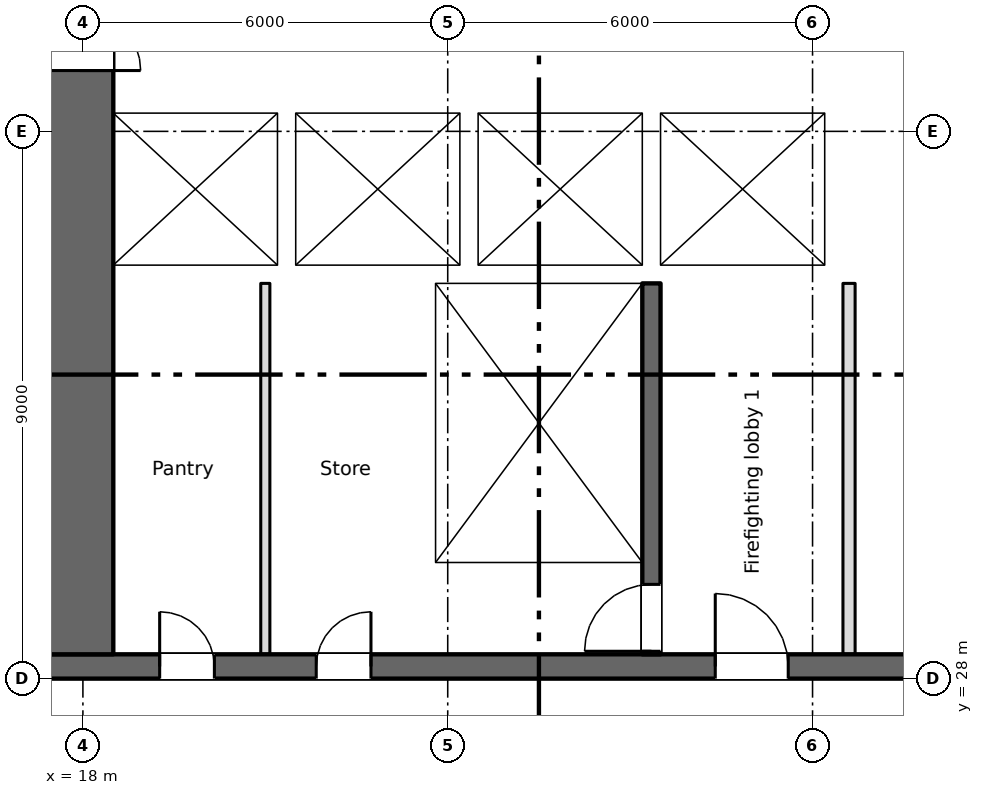
"""IFC4 building model, lengths in metres.
Left out: names, types, materials, properties, quantities, classifications, styles, units other than length and angle.
Written with IfcOpenShell. Run it as: python <this file> out.ifc"""

import sys

from ifc_helpers import new_model, si_unit, direction, frame, frame_2d, origin, place, context, subcontext, project, spatial, rectangle, extrude, element, fill, save


model = new_model("IFC4")
c1 = context("Model", 3, precision=1e-05, world=origin(), true_north=direction((0.0, 1.0)))
c2 = subcontext(c1, "Body", "Model", "MODEL_VIEW")
j1 = project(units=[si_unit("LENGTHUNIT", "METRE"), si_unit("PLANEANGLEUNIT", "RADIAN")], contexts=[c1])
p1 = place(None, origin())
s1 = spatial("IfcSite", under=j1, at=p1, CompositionType="ELEMENT")
p2 = place(p1, origin())
s2 = spatial("IfcBuilding", under=s1, at=p2, CompositionType="ELEMENT")
p3 = place(p2, frame((0.0, 0.0, 17.9)))
s3 = spatial("IfcBuildingStorey", under=s2, at=p3, CompositionType="ELEMENT", Elevation=17.9)
p4 = place(p3, frame((6.7, 28.2, 0.0), z_axis=(0.0, 0.0, 1.0), x_axis=(1.0, 0.0, 0.0)))
e1 = element("IfcWall", 1, at=p4, inside=s3, PredefinedType="SHEAR", context=c2, shape_type="SweptSolid", body=[
    extrude(rectangle(XDim=66.3, YDim=0.4, at=frame_2d((33.15, 0.0))), origin(), (0.0, 0.0, 1.0), 3.8),
])
p5 = place(p4, frame((12.562, 0.0, 0.0)))
e2 = element("IfcOpeningElement", 2, at=p5, cuts=e1, PredefinedType="OPENING", context=c2, shape_type="SweptSolid", body=[
    extrude(rectangle(XDim=0.9, YDim=2.1, at=frame_2d((0.45, 1.05))), frame((0.0, 0.21, 0.0), z_axis=(0.0, -1.0, 0.0), x_axis=(1.0, 0.0, 0.0)), (0.0, 0.0, 1.0), 0.42),
])
p6 = place(p4, frame((15.137, 0.0, 0.0)))
e3 = element("IfcOpeningElement", 3, at=p6, cuts=e1, PredefinedType="OPENING", context=c2, shape_type="SweptSolid", body=[
    extrude(rectangle(XDim=0.9, YDim=2.1, at=frame_2d((0.45, 1.05))), frame((0.0, 0.21, 0.0), z_axis=(0.0, -1.0, 0.0), x_axis=(1.0, 0.0, 0.0)), (0.0, 0.0, 1.0), 0.42),
])
p7 = place(p4, frame((49.85, 0.0, 0.0)))
e4 = element("IfcOpeningElement", 4, at=p7, cuts=e1, PredefinedType="OPENING", context=c2, shape_type="SweptSolid", body=[
    extrude(rectangle(XDim=0.9, YDim=2.1, at=frame_2d((0.45, 1.05))), frame((0.0, 0.21, 0.0), z_axis=(0.0, -1.0, 0.0), x_axis=(1.0, 0.0, 0.0)), (0.0, 0.0, 1.0), 0.42),
])
p8 = place(p4, frame((0.562, 0.0, 0.0)))
e5 = element("IfcOpeningElement", 5, at=p8, cuts=e1, PredefinedType="OPENING", context=c2, shape_type="SweptSolid", body=[
    extrude(rectangle(XDim=0.9, YDim=2.1, at=frame_2d((0.45, 1.05))), frame((0.0, 0.21, 0.0), z_axis=(0.0, -1.0, 0.0), x_axis=(1.0, 0.0, 0.0)), (0.0, 0.0, 1.0), 0.42),
])
p9 = place(p4, frame((2.137, 0.0, 0.0)))
e6 = element("IfcOpeningElement", 6, at=p9, cuts=e1, PredefinedType="OPENING", context=c2, shape_type="SweptSolid", body=[
    extrude(rectangle(XDim=0.9, YDim=2.1, at=frame_2d((0.45, 1.05))), frame((0.0, 0.21, 0.0), z_axis=(0.0, -1.0, 0.0), x_axis=(1.0, 0.0, 0.0)), (0.0, 0.0, 1.0), 0.42),
])
p10 = place(p4, frame((61.45, 0.0, 0.0)))
e7 = element("IfcOpeningElement", 7, at=p10, cuts=e1, PredefinedType="OPENING", context=c2, shape_type="SweptSolid", body=[
    extrude(rectangle(XDim=0.9, YDim=2.1, at=frame_2d((0.45, 1.05))), frame((0.0, 0.21, 0.0), z_axis=(0.0, -1.0, 0.0), x_axis=(1.0, 0.0, 0.0)), (0.0, 0.0, 1.0), 0.42),
])
p11 = place(p4, frame((4.7, 0.0, 0.0)))
e8 = element("IfcOpeningElement", 8, at=p11, cuts=e1, PredefinedType="OPENING", context=c2, shape_type="SweptSolid", body=[
    extrude(rectangle(XDim=1.2, YDim=2.1, at=frame_2d((0.6, 1.05))), frame((0.0, 0.21, 0.0), z_axis=(0.0, -1.0, 0.0), x_axis=(1.0, 0.0, 0.0)), (0.0, 0.0, 1.0), 0.42),
])
p12 = place(p4, frame((31.7, 0.0, 0.0)))
e9 = element("IfcOpeningElement", 9, at=p12, cuts=e1, PredefinedType="OPENING", context=c2, shape_type="SweptSolid", body=[
    extrude(rectangle(XDim=1.2, YDim=2.1, at=frame_2d((0.6, 1.05))), frame((0.0, 0.21, 0.0), z_axis=(0.0, -1.0, 0.0), x_axis=(1.0, 0.0, 0.0)), (0.0, 0.0, 1.0), 0.42),
])
p13 = place(p4, frame((55.2, 0.0, 0.0)))
e10 = element("IfcOpeningElement", 10, at=p13, cuts=e1, PredefinedType="OPENING", context=c2, shape_type="SweptSolid", body=[
    extrude(rectangle(XDim=1.2, YDim=2.1, at=frame_2d((0.6, 1.05))), frame((0.0, 0.21, 0.0), z_axis=(0.0, -1.0, 0.0), x_axis=(1.0, 0.0, 0.0)), (0.0, 0.0, 1.0), 0.42),
])
p14 = place(p4, frame((21.7, 0.0, 0.0)))
e11 = element("IfcOpeningElement", 11, at=p14, cuts=e1, PredefinedType="OPENING", context=c2, shape_type="SweptSolid", body=[
    extrude(rectangle(XDim=1.2, YDim=2.1, at=frame_2d((0.6, 1.05))), frame((0.0, 0.21, 0.0), z_axis=(0.0, -1.0, 0.0), x_axis=(1.0, 0.0, 0.0)), (0.0, 0.0, 1.0), 0.42),
])
p15 = place(p4, frame((41.7, 0.0, 0.0)))
e12 = element("IfcOpeningElement", 12, at=p15, cuts=e1, PredefinedType="OPENING", context=c2, shape_type="SweptSolid", body=[
    extrude(rectangle(XDim=1.2, YDim=2.1, at=frame_2d((0.6, 1.05))), frame((0.0, 0.21, 0.0), z_axis=(0.0, -1.0, 0.0), x_axis=(1.0, 0.0, 0.0)), (0.0, 0.0, 1.0), 0.42),
])
p16 = place(p4, frame((24.85, 0.0, 0.0)))
e13 = element("IfcOpeningElement", 13, at=p16, cuts=e1, PredefinedType="OPENING", context=c2, shape_type="SweptSolid", body=[
    extrude(rectangle(XDim=2.4, YDim=2.1, at=frame_2d((1.2, 1.05))), frame((0.0, 0.21, 0.0), z_axis=(0.0, -1.0, 0.0), x_axis=(1.0, 0.0, 0.0)), (0.0, 0.0, 1.0), 0.42),
])
p17 = place(p4, frame((37.35, 0.0, 0.0)))
e14 = element("IfcOpeningElement", 14, at=p17, cuts=e1, PredefinedType="OPENING", context=c2, shape_type="SweptSolid", body=[
    extrude(rectangle(XDim=2.4, YDim=2.1, at=frame_2d((1.2, 1.05))), frame((0.0, 0.21, 0.0), z_axis=(0.0, -1.0, 0.0), x_axis=(1.0, 0.0, 0.0)), (0.0, 0.0, 1.0), 0.42),
])
p18 = place(p4, frame((7.8, 0.0, 0.0)))
e15 = element("IfcOpeningElement", 15, at=p18, cuts=e1, PredefinedType="OPENING", context=c2, shape_type="SweptSolid", body=[
    extrude(rectangle(XDim=2.4, YDim=2.1, at=frame_2d((1.2, 1.05))), frame((0.0, 0.21, 0.0), z_axis=(0.0, -1.0, 0.0), x_axis=(1.0, 0.0, 0.0)), (0.0, 0.0, 1.0), 0.42),
])
p19 = place(p4, frame((28.85, 0.0, 0.0)))
e16 = element("IfcOpeningElement", 16, at=p19, cuts=e1, PredefinedType="OPENING", context=c2, shape_type="SweptSolid", body=[
    extrude(rectangle(XDim=0.9, YDim=2.1, at=frame_2d((0.45, 1.05))), frame((0.0, 0.21, 0.0), z_axis=(0.0, -1.0, 0.0), x_axis=(1.0, 0.0, 0.0)), (0.0, 0.0, 1.0), 0.42),
])
p20 = place(p4, frame((34.85, 0.0, 0.0)))
e17 = element("IfcOpeningElement", 17, at=p20, cuts=e1, PredefinedType="OPENING", context=c2, shape_type="SweptSolid", body=[
    extrude(rectangle(XDim=0.9, YDim=2.1, at=frame_2d((0.45, 1.05))), frame((0.0, 0.21, 0.0), z_axis=(0.0, -1.0, 0.0), x_axis=(1.0, 0.0, 0.0)), (0.0, 0.0, 1.0), 0.42),
])
p21 = place(p3, frame((17.95, 28.4, 0.0), z_axis=(0.0, 0.0, 1.0), x_axis=(0.0, 1.0, 0.0)))
e18 = element("IfcWall", 18, at=p21, inside=s3, PredefinedType="SHEAR", context=c2, shape_type="SweptSolid", body=[
    extrude(rectangle(XDim=16.5, YDim=1.1, at=frame_2d((8.25, 0.0))), origin(), (0.0, 0.0, 1.0), 3.8),
])
p22 = place(p21, frame((9.6, 0.0, 0.0)))
e19 = element("IfcOpeningElement", 19, at=p22, cuts=e18, PredefinedType="OPENING", context=c2, shape_type="SweptSolid", body=[
    extrude(rectangle(XDim=2.0, YDim=2.1, at=frame_2d((1.0, 1.05))), frame((0.0, 0.56, 0.0), z_axis=(0.0, -1.0, 0.0), x_axis=(1.0, 0.0, 0.0)), (0.0, 0.0, 1.0), 1.12),
])
p23 = place(p21, frame((15.2, 0.0, 0.0)))
e20 = element("IfcOpeningElement", 20, at=p23, cuts=e18, PredefinedType="OPENING", context=c2, shape_type="SweptSolid", body=[
    extrude(rectangle(XDim=1.2, YDim=2.1, at=frame_2d((0.6, 1.05))), frame((0.0, 0.56, 0.0), z_axis=(0.0, -1.0, 0.0), x_axis=(1.0, 0.0, 0.0)), (0.0, 0.0, 1.0), 1.12),
])
p24 = place(p3, frame((23.65, 28.4, 0.0), z_axis=(0.0, 0.0, 1.0), x_axis=(0.0, 1.0, 0.0)))
e21 = element("IfcWall", 21, at=p24, inside=s3, PredefinedType="SHEAR", context=c2, shape_type="SweptSolid", body=[
    extrude(rectangle(XDim=6.1, YDim=0.3, at=frame_2d((3.05, 0.0))), origin(), (0.0, 0.0, 1.0), 3.8),
])
p25 = place(p3, frame((27.35, 28.4, 0.0), z_axis=(0.0, 0.0, 1.0), x_axis=(0.0, 1.0, 0.0)))
e22 = element("IfcWall", 22, at=p25, inside=s3, PredefinedType="SHEAR", context=c2, shape_type="SweptSolid", body=[
    extrude(rectangle(XDim=6.1, YDim=0.3, at=frame_2d((3.05, 0.0))), origin(), (0.0, 0.0, 1.0), 3.8),
])
p26 = place(p25, frame((0.05, 0.0, 0.0)))
e23 = element("IfcOpeningElement", 23, at=p26, cuts=e22, PredefinedType="OPENING", context=c2, shape_type="SweptSolid", body=[
    extrude(rectangle(XDim=1.1, YDim=2.1, at=frame_2d((0.55, 1.05))), frame((0.0, 0.16, 0.0), z_axis=(0.0, -1.0, 0.0), x_axis=(1.0, 0.0, 0.0)), (0.0, 0.0, 1.0), 0.32),
])
p27 = place(p3, frame((18.5, 34.65, 0.0), z_axis=(0.0, 0.0, 1.0), x_axis=(1.0, 0.0, 0.0)))
e24 = element("IfcWall", 24, at=p27, inside=s3, PredefinedType="SHEAR", context=c2, shape_type="SweptSolid", body=[
    extrude(rectangle(XDim=12.2, YDim=0.3, at=frame_2d((6.1, 0.0))), origin(), (0.0, 0.0, 1.0), 3.8),
])
p28 = place(p27, frame((9.8, 0.0, 0.0)))
e25 = element("IfcOpeningElement", 25, at=p28, cuts=e24, PredefinedType="OPENING", context=c2, shape_type="SweptSolid", body=[
    extrude(rectangle(XDim=1.1, YDim=2.1, at=frame_2d((0.55, 1.05))), frame((0.0, 0.16, 0.0), z_axis=(0.0, -1.0, 0.0), x_axis=(1.0, 0.0, 0.0)), (0.0, 0.0, 1.0), 0.32),
])
p29 = place(p3, frame((18.5, 37.45, 0.0), z_axis=(0.0, 0.0, 1.0), x_axis=(1.0, 0.0, 0.0)))
e26 = element("IfcWall", 26, at=p29, inside=s3, PredefinedType="SHEAR", context=c2, shape_type="SweptSolid", body=[
    extrude(rectangle(XDim=12.2, YDim=0.3, at=frame_2d((6.1, 0.0))), origin(), (0.0, 0.0, 1.0), 3.8),
])
p30 = place(p29, frame((0.8, 0.0, 0.0)))
e27 = element("IfcOpeningElement", 27, at=p30, cuts=e26, PredefinedType="OPENING", context=c2, shape_type="SweptSolid", body=[
    extrude(rectangle(XDim=1.1, YDim=2.1, at=frame_2d((0.55, 1.05))), frame((0.0, 0.16, 0.0), z_axis=(0.0, -1.0, 0.0), x_axis=(1.0, 0.0, 0.0)), (0.0, 0.0, 1.0), 0.32),
])
p31 = place(p29, frame((3.8, 0.0, 0.0)))
e28 = element("IfcOpeningElement", 28, at=p31, cuts=e26, PredefinedType="OPENING", context=c2, shape_type="SweptSolid", body=[
    extrude(rectangle(XDim=1.1, YDim=2.1, at=frame_2d((0.55, 1.05))), frame((0.0, 0.16, 0.0), z_axis=(0.0, -1.0, 0.0), x_axis=(1.0, 0.0, 0.0)), (0.0, 0.0, 1.0), 0.32),
])
p32 = place(p29, frame((6.8, 0.0, 0.0)))
e29 = element("IfcOpeningElement", 29, at=p32, cuts=e26, PredefinedType="OPENING", context=c2, shape_type="SweptSolid", body=[
    extrude(rectangle(XDim=1.1, YDim=2.1, at=frame_2d((0.55, 1.05))), frame((0.0, 0.16, 0.0), z_axis=(0.0, -1.0, 0.0), x_axis=(1.0, 0.0, 0.0)), (0.0, 0.0, 1.0), 0.32),
])
p33 = place(p3, frame((27.35, 34.8, 0.0), z_axis=(0.0, 0.0, 1.0), x_axis=(0.0, 1.0, 0.0)))
e30 = element("IfcWall", 30, at=p33, inside=s3, PredefinedType="SHEAR", context=c2, shape_type="SweptSolid", body=[
    extrude(rectangle(XDim=2.5, YDim=0.3, at=frame_2d((1.25, 0.0))), origin(), (0.0, 0.0, 1.0), 3.8),
])
p34 = place(p3, frame((30.45, 34.8, 0.0), z_axis=(0.0, 0.0, 1.0), x_axis=(0.0, 1.0, 0.0)))
e31 = element("IfcWall", 31, at=p34, inside=s3, PredefinedType="SHEAR", context=c2, shape_type="SweptSolid", body=[
    extrude(rectangle(XDim=2.5, YDim=0.5, at=frame_2d((1.25, 0.0))), origin(), (0.0, 0.0, 1.0), 3.8),
])
for number, where, z_axis, x_axis in (
    (32, (21.35, 34.8, 0.0), (0.0, 0.0, 1.0), (0.0, 1.0, 0.0)),
    (33, (24.35, 34.8, 0.0), (0.0, 0.0, 1.0), (0.0, 1.0, 0.0)),
):
    element("IfcWall", number, at=place(p3, frame(where, z_axis=z_axis, x_axis=x_axis)), inside=s3, PredefinedType="SHEAR", context=c2, shape_type="SweptSolid", body=[
        extrude(rectangle(XDim=2.5, YDim=0.3, at=frame_2d((1.25, 0.0))), origin(), (0.0, 0.0, 1.0), 3.8),
    ])
p35 = place(p3, frame((30.6, 28.4, 0.0), z_axis=(0.0, 0.0, 1.0), x_axis=(0.0, 1.0, 0.0)))
e34 = element("IfcWall", 34, at=p35, inside=s3, PredefinedType="PARTITIONING", context=c2, shape_type="SweptSolid", body=[
    extrude(rectangle(XDim=6.1, YDim=0.2, at=frame_2d((3.05, 0.0))), origin(), (0.0, 0.0, 1.0), 3.8),
])
p36 = place(p3, frame((21.0, 28.4, 0.0), z_axis=(0.0, 0.0, 1.0), x_axis=(0.0, 1.0, 0.0)))
e35 = element("IfcWall", 35, at=p36, inside=s3, PredefinedType="PARTITIONING", context=c2, shape_type="SweptSolid", body=[
    extrude(rectangle(XDim=6.1, YDim=0.15, at=frame_2d((3.05, 0.0))), origin(), (0.0, 0.0, 1.0), 3.8),
])
p37 = place(p5, origin())
e36 = element("IfcDoor", 36, at=p37, inside=s3, OperationType="SINGLE_SWING_LEFT", PredefinedType="DOOR", context=c2, shape_type="SweptSolid", body=[
    extrude(rectangle(XDim=0.9, YDim=2.1, at=frame_2d((0.45, 1.05))), frame((0.0, 0.025, 0.0), z_axis=(0.0, -1.0, 0.0), x_axis=(1.0, 0.0, 0.0)), (0.0, 0.0, 1.0), 0.05),
])
fill(e2, e36)
p38 = place(p6, origin())
e37 = element("IfcDoor", 37, at=p38, inside=s3, OperationType="SINGLE_SWING_RIGHT", PredefinedType="DOOR", context=c2, shape_type="SweptSolid", body=[
    extrude(rectangle(XDim=0.9, YDim=2.1, at=frame_2d((0.45, 1.05))), frame((0.0, 0.025, 0.0), z_axis=(0.0, -1.0, 0.0), x_axis=(1.0, 0.0, 0.0)), (0.0, 0.0, 1.0), 0.05),
])
fill(e3, e37)
p39 = place(p30, origin())
e38 = element("IfcDoor", 38, at=p39, inside=s3, OperationType="SLIDING_TO_LEFT", PredefinedType="DOOR", context=c2, shape_type="SweptSolid", body=[
    extrude(rectangle(XDim=1.1, YDim=2.1, at=frame_2d((0.55, 1.05))), frame((0.0, 0.025, 0.0), z_axis=(0.0, -1.0, 0.0), x_axis=(1.0, 0.0, 0.0)), (0.0, 0.0, 1.0), 0.05),
])
fill(e27, e38)
p40 = place(p31, origin())
e39 = element("IfcDoor", 39, at=p40, inside=s3, OperationType="SLIDING_TO_LEFT", PredefinedType="DOOR", context=c2, shape_type="SweptSolid", body=[
    extrude(rectangle(XDim=1.1, YDim=2.1, at=frame_2d((0.55, 1.05))), frame((0.0, 0.025, 0.0), z_axis=(0.0, -1.0, 0.0), x_axis=(1.0, 0.0, 0.0)), (0.0, 0.0, 1.0), 0.05),
])
fill(e28, e39)
p41 = place(p32, origin())
e40 = element("IfcDoor", 40, at=p41, inside=s3, OperationType="SLIDING_TO_LEFT", PredefinedType="DOOR", context=c2, shape_type="SweptSolid", body=[
    extrude(rectangle(XDim=1.1, YDim=2.1, at=frame_2d((0.55, 1.05))), frame((0.0, 0.025, 0.0), z_axis=(0.0, -1.0, 0.0), x_axis=(1.0, 0.0, 0.0)), (0.0, 0.0, 1.0), 0.05),
])
fill(e29, e40)
p42 = place(p28, origin())
e41 = element("IfcDoor", 41, at=p42, inside=s3, OperationType="SLIDING_TO_LEFT", PredefinedType="DOOR", context=c2, shape_type="SweptSolid", body=[
    extrude(rectangle(XDim=1.1, YDim=2.1, at=frame_2d((0.55, 1.05))), frame((0.0, 0.025, 0.0), z_axis=(0.0, -1.0, 0.0), x_axis=(1.0, 0.0, 0.0)), (0.0, 0.0, 1.0), 0.05),
])
fill(e25, e41)
p43 = place(p26, origin())
e42 = element("IfcDoor", 42, at=p43, inside=s3, OperationType="SINGLE_SWING_LEFT", PredefinedType="DOOR", context=c2, shape_type="SweptSolid", body=[
    extrude(rectangle(XDim=1.1, YDim=2.1, at=frame_2d((0.55, 1.05))), frame((0.0, 0.025, 0.0), z_axis=(0.0, -1.0, 0.0), x_axis=(1.0, 0.0, 0.0)), (0.0, 0.0, 1.0), 0.05),
])
fill(e23, e42)
p44 = place(p14, origin())
e43 = element("IfcDoor", 43, at=p44, inside=s3, OperationType="SINGLE_SWING_LEFT", PredefinedType="DOOR", context=c2, shape_type="SweptSolid", body=[
    extrude(rectangle(XDim=1.2, YDim=2.1, at=frame_2d((0.6, 1.05))), frame((0.0, 0.025, 0.0), z_axis=(0.0, -1.0, 0.0), x_axis=(1.0, 0.0, 0.0)), (0.0, 0.0, 1.0), 0.05),
])
fill(e11, e43)
p45 = place(p22, origin())
e44 = element("IfcDoor", 44, at=p45, inside=s3, OperationType="DOUBLE_DOOR_SINGLE_SWING", PredefinedType="DOOR", context=c2, shape_type="SweptSolid", body=[
    extrude(rectangle(XDim=2.0, YDim=2.1, at=frame_2d((1.0, 1.05))), frame((0.0, 0.025, 0.0), z_axis=(0.0, -1.0, 0.0), x_axis=(1.0, 0.0, 0.0)), (0.0, 0.0, 1.0), 0.05),
])
fill(e19, e44)
save(model, sys.argv[1])
